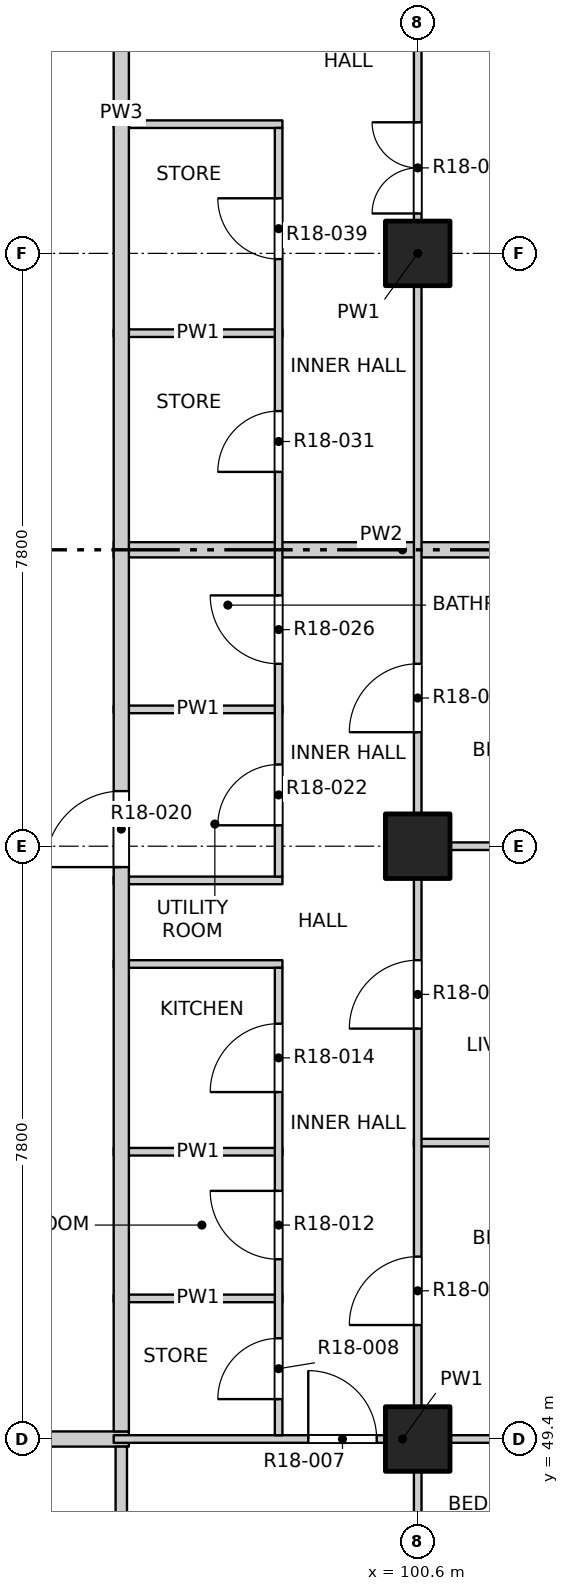
"""IFC4 building model, lengths in metres.
Left out: names, types, materials, properties, quantities, classifications, styles, units other than length and angle.
Written with IfcOpenShell. Run it as: python <this file> out.ifc"""

import sys

from ifc_helpers import new_model, si_unit, direction, frame, frame_2d, origin, origin_2d, place, context, subcontext, project, spatial, rectangle, extrude, element, fill, save


model = new_model("IFC4")
c1 = context("Model", 3, precision=1e-05, world=origin(), true_north=direction((0.0, 1.0)))
c2 = subcontext(c1, "Body", "Model", "MODEL_VIEW")
j1 = project(units=[si_unit("LENGTHUNIT", "METRE"), si_unit("PLANEANGLEUNIT", "RADIAN")], contexts=[c1])
p1 = place(None, origin())
s1 = spatial("IfcSite", under=j1, at=p1, CompositionType="ELEMENT")
p2 = place(p1, origin())
s2 = spatial("IfcBuilding", under=s1, at=p2, CompositionType="ELEMENT")
p3 = place(p2, frame((0.0, 0.0, 186.0)))
s3 = spatial("IfcBuildingStorey", under=s2, at=p3, CompositionType="ELEMENT", Elevation=186.0)
for number, where, z_axis, x_axis in (
    (1, (100.6, 49.4, -0.25), (0.0, 0.0, 1.0), (1.0, 0.0, 0.0)),
    (2, (100.6, 57.2, -0.25), (0.0, 0.0, 1.0), (1.0, 0.0, 0.0)),
    (3, (100.6, 65.0, -0.25), (0.0, 0.0, 1.0), (1.0, 0.0, 0.0)),
):
    element("IfcColumn", number, at=place(p3, frame(where, z_axis=z_axis, x_axis=x_axis)), inside=s3, PredefinedType="COLUMN", context=c2, shape_type="SweptSolid", body=[
        extrude(rectangle(XDim=0.85, YDim=0.85, at=origin_2d()), origin(), (0.0, 0.0, 1.0), 3.4),
    ])
p4 = place(p3, frame((73.2, 49.4, 0.0), z_axis=(0.0, 0.0, 1.0), x_axis=(1.0, 0.0, 0.0)))
e4 = element("IfcWall", 4, at=p4, inside=s3, PredefinedType="PARTITIONING", context=c2, shape_type="SweptSolid", body=[
    extrude(rectangle(XDim=23.6, YDim=0.2, at=frame_2d((11.8, 0.0))), origin(), (0.0, 0.0, 1.0), 3.15),
])
p5 = place(p4, frame((4.525, 0.0, 0.0)))
e5 = element("IfcOpeningElement", 5, at=p5, cuts=e4, PredefinedType="OPENING", context=c2, shape_type="SweptSolid", body=[
    extrude(rectangle(XDim=1.2, YDim=2.1, at=frame_2d((0.6, 1.05))), frame((0.0, 0.11, 0.0), z_axis=(0.0, -1.0, 0.0), x_axis=(1.0, 0.0, 0.0)), (0.0, 0.0, 1.0), 0.22),
])
p6 = place(p4, frame((12.325, 0.0, 0.0)))
e6 = element("IfcOpeningElement", 6, at=p6, cuts=e4, PredefinedType="OPENING", context=c2, shape_type="SweptSolid", body=[
    extrude(rectangle(XDim=1.2, YDim=2.1, at=frame_2d((0.6, 1.05))), frame((0.0, 0.11, 0.0), z_axis=(0.0, -1.0, 0.0), x_axis=(1.0, 0.0, 0.0)), (0.0, 0.0, 1.0), 0.22),
])
p7 = place(p4, frame((20.125, 0.0, 0.0)))
e7 = element("IfcOpeningElement", 7, at=p7, cuts=e4, PredefinedType="OPENING", context=c2, shape_type="SweptSolid", body=[
    extrude(rectangle(XDim=1.2, YDim=2.1, at=frame_2d((0.6, 1.05))), frame((0.0, 0.11, 0.0), z_axis=(0.0, -1.0, 0.0), x_axis=(1.0, 0.0, 0.0)), (0.0, 0.0, 1.0), 0.22),
])
p8 = place(p3, frame((96.6, 49.4, 0.0), z_axis=(0.0, 0.0, 1.0), x_axis=(1.0, 0.0, 0.0)))
e8 = element("IfcWall", 8, at=p8, inside=s3, PredefinedType="PARTITIONING", context=c2, shape_type="SweptSolid", body=[
    extrude(rectangle(XDim=7.6, YDim=0.1, at=frame_2d((3.8, 0.0))), origin(), (0.0, 0.0, 1.0), 3.15),
])
p9 = place(p8, frame((2.56, 0.0, 0.0)))
e9 = element("IfcOpeningElement", 9, at=p9, cuts=e8, PredefinedType="OPENING", context=c2, shape_type="SweptSolid", body=[
    extrude(rectangle(XDim=0.9, YDim=2.1, at=frame_2d((0.45, 1.05))), frame((0.0, 0.06, 0.0), z_axis=(0.0, -1.0, 0.0), x_axis=(1.0, 0.0, 0.0)), (0.0, 0.0, 1.0), 0.12),
])
for number, where, z_axis, x_axis in (
    (10, (96.6, 51.25, 0.0), (0.0, 0.0, 1.0), (1.0, 0.0, 0.0)),
    (11, (96.6, 53.18, 0.0), (0.0, 0.0, 1.0), (1.0, 0.0, 0.0)),
):
    element("IfcWall", number, at=place(p3, frame(where, z_axis=z_axis, x_axis=x_axis)), inside=s3, PredefinedType="PARTITIONING", context=c2, shape_type="SweptSolid", body=[
        extrude(rectangle(XDim=2.22, YDim=0.1, at=frame_2d((1.11, 0.0))), origin(), (0.0, 0.0, 1.0), 3.15),
    ])
p10 = place(p3, frame((100.55, 53.3, 0.0), z_axis=(0.0, 0.0, 1.0), x_axis=(1.0, 0.0, 0.0)))
e12 = element("IfcWall", 12, at=p10, inside=s3, PredefinedType="PARTITIONING", context=c2, shape_type="SweptSolid", body=[
    extrude(rectangle(XDim=3.65, YDim=0.1, at=frame_2d((1.825, 0.0))), origin(), (0.0, 0.0, 1.0), 3.15),
])
for number, where, z_axis, x_axis in (
    (13, (96.6, 55.65, 0.0), (0.0, 0.0, 1.0), (1.0, 0.0, 0.0)),
    (14, (96.6, 56.75, 0.0), (0.0, 0.0, 1.0), (1.0, 0.0, 0.0)),
):
    element("IfcWall", number, at=place(p3, frame(where, z_axis=z_axis, x_axis=x_axis)), inside=s3, PredefinedType="PARTITIONING", context=c2, shape_type="SweptSolid", body=[
        extrude(rectangle(XDim=2.22, YDim=0.1, at=frame_2d((1.11, 0.0))), origin(), (0.0, 0.0, 1.0), 3.15),
    ])
p11 = place(p3, frame((100.55, 57.2, 0.0), z_axis=(0.0, 0.0, 1.0), x_axis=(1.0, 0.0, 0.0)))
e15 = element("IfcWall", 15, at=p11, inside=s3, PredefinedType="PARTITIONING", context=c2, shape_type="SweptSolid", body=[
    extrude(rectangle(XDim=3.65, YDim=0.1, at=frame_2d((1.825, 0.0))), origin(), (0.0, 0.0, 1.0), 3.15),
])
p12 = place(p3, frame((96.6, 59.0, 0.0), z_axis=(0.0, 0.0, 1.0), x_axis=(1.0, 0.0, 0.0)))
e16 = element("IfcWall", 16, at=p12, inside=s3, PredefinedType="PARTITIONING", context=c2, shape_type="SweptSolid", body=[
    extrude(rectangle(XDim=2.22, YDim=0.1, at=frame_2d((1.11, 0.0))), origin(), (0.0, 0.0, 1.0), 3.15),
])
p13 = place(p3, frame((96.6, 61.1, 0.0), z_axis=(0.0, 0.0, 1.0), x_axis=(1.0, 0.0, 0.0)))
e17 = element("IfcWall", 17, at=p13, inside=s3, PredefinedType="PARTITIONING", context=c2, shape_type="SweptSolid", body=[
    extrude(rectangle(XDim=7.6, YDim=0.2, at=frame_2d((3.8, 0.0))), origin(), (0.0, 0.0, 1.0), 2.55),
])
for number, where, z_axis, x_axis in (
    (18, (96.6, 63.95, 0.0), (0.0, 0.0, 1.0), (1.0, 0.0, 0.0)),
    (19, (96.6, 66.7, 0.0), (0.0, 0.0, 1.0), (1.0, 0.0, 0.0)),
):
    element("IfcWall", number, at=place(p3, frame(where, z_axis=z_axis, x_axis=x_axis)), inside=s3, PredefinedType="PARTITIONING", context=c2, shape_type="SweptSolid", body=[
        extrude(rectangle(XDim=2.22, YDim=0.1, at=frame_2d((1.11, 0.0))), origin(), (0.0, 0.0, 1.0), 3.15),
    ])
p14 = place(p3, frame((96.7, 45.8, 0.0), z_axis=(0.0, 0.0, 1.0), x_axis=(0.0, 1.0, 0.0)))
e20 = element("IfcWall", 20, at=p14, inside=s3, PredefinedType="PARTITIONING", context=c2, shape_type="SweptSolid", body=[
    extrude(rectangle(XDim=3.5, YDim=0.15, at=frame_2d((1.75, 0.0))), origin(), (0.0, 0.0, 1.0), 3.15),
])
p15 = place(p3, frame((96.7, 49.5, 0.0), z_axis=(0.0, 0.0, 1.0), x_axis=(0.0, 1.0, 0.0)))
e21 = element("IfcWall", 21, at=p15, inside=s3, PredefinedType="PARTITIONING", context=c2, shape_type="SweptSolid", body=[
    extrude(rectangle(XDim=34.7, YDim=0.2, at=frame_2d((17.35, 0.0))), origin(), (0.0, 0.0, 1.0), 3.15),
])
p16 = place(p15, frame((7.425, 0.0, 0.0)))
e22 = element("IfcOpeningElement", 22, at=p16, cuts=e21, PredefinedType="OPENING", context=c2, shape_type="SweptSolid", body=[
    extrude(rectangle(XDim=1.0, YDim=2.1, at=frame_2d((0.5, 1.05))), frame((0.0, 0.11, 0.0), z_axis=(0.0, -1.0, 0.0), x_axis=(1.0, 0.0, 0.0)), (0.0, 0.0, 1.0), 0.22),
])
p17 = place(p15, frame((18.475, 0.0, 0.0)))
e23 = element("IfcOpeningElement", 23, at=p17, cuts=e21, PredefinedType="OPENING", context=c2, shape_type="SweptSolid", body=[
    extrude(rectangle(XDim=1.0, YDim=2.1, at=frame_2d((0.5, 1.05))), frame((0.0, 0.11, 0.0), z_axis=(0.0, -1.0, 0.0), x_axis=(1.0, 0.0, 0.0)), (0.0, 0.0, 1.0), 0.22),
])
p18 = place(p15, frame((29.025, 0.0, 0.0)))
e24 = element("IfcOpeningElement", 24, at=p18, cuts=e21, PredefinedType="OPENING", context=c2, shape_type="SweptSolid", body=[
    extrude(rectangle(XDim=1.0, YDim=2.1, at=frame_2d((0.5, 1.05))), frame((0.0, 0.11, 0.0), z_axis=(0.0, -1.0, 0.0), x_axis=(1.0, 0.0, 0.0)), (0.0, 0.0, 1.0), 0.22),
])
p19 = place(p3, frame((98.77, 49.45, 0.0), z_axis=(0.0, 0.0, 1.0), x_axis=(0.0, 1.0, 0.0)))
e25 = element("IfcWall", 25, at=p19, inside=s3, PredefinedType="PARTITIONING", context=c2, shape_type="SweptSolid", body=[
    extrude(rectangle(XDim=6.15, YDim=0.1, at=frame_2d((3.075, 0.0))), origin(), (0.0, 0.0, 1.0), 3.15),
])
p20 = place(p19, frame((0.475, 0.0, 0.0)))
e26 = element("IfcOpeningElement", 26, at=p20, cuts=e25, PredefinedType="OPENING", context=c2, shape_type="SweptSolid", body=[
    extrude(rectangle(XDim=0.8, YDim=2.1, at=frame_2d((0.4, 1.05))), frame((0.0, 0.06, 0.0), z_axis=(0.0, -1.0, 0.0), x_axis=(1.0, 0.0, 0.0)), (0.0, 0.0, 1.0), 0.12),
])
p21 = place(p19, frame((2.315, 0.0, 0.0)))
e27 = element("IfcOpeningElement", 27, at=p21, cuts=e25, PredefinedType="OPENING", context=c2, shape_type="SweptSolid", body=[
    extrude(rectangle(XDim=0.9, YDim=2.1, at=frame_2d((0.45, 1.05))), frame((0.0, 0.06, 0.0), z_axis=(0.0, -1.0, 0.0), x_axis=(1.0, 0.0, 0.0)), (0.0, 0.0, 1.0), 0.12),
])
p22 = place(p19, frame((4.515, 0.0, 0.0)))
e28 = element("IfcOpeningElement", 28, at=p22, cuts=e25, PredefinedType="OPENING", context=c2, shape_type="SweptSolid", body=[
    extrude(rectangle(XDim=0.9, YDim=2.1, at=frame_2d((0.45, 1.05))), frame((0.0, 0.06, 0.0), z_axis=(0.0, -1.0, 0.0), x_axis=(1.0, 0.0, 0.0)), (0.0, 0.0, 1.0), 0.12),
])
p23 = place(p3, frame((98.77, 56.8, 0.0), z_axis=(0.0, 0.0, 1.0), x_axis=(0.0, 1.0, 0.0)))
e29 = element("IfcWall", 29, at=p23, inside=s3, PredefinedType="PARTITIONING", context=c2, shape_type="SweptSolid", body=[
    extrude(rectangle(XDim=9.85, YDim=0.1, at=frame_2d((4.925, 0.0))), origin(), (0.0, 0.0, 1.0), 3.15),
])
p24 = place(p23, frame((0.675, 0.0, 0.0)))
e30 = element("IfcOpeningElement", 30, at=p24, cuts=e29, PredefinedType="OPENING", context=c2, shape_type="SweptSolid", body=[
    extrude(rectangle(XDim=0.8, YDim=2.1, at=frame_2d((0.4, 1.05))), frame((0.0, 0.06, 0.0), z_axis=(0.0, -1.0, 0.0), x_axis=(1.0, 0.0, 0.0)), (0.0, 0.0, 1.0), 0.12),
])
p25 = place(p23, frame((2.8, 0.0, 0.0)))
e31 = element("IfcOpeningElement", 31, at=p25, cuts=e29, PredefinedType="OPENING", context=c2, shape_type="SweptSolid", body=[
    extrude(rectangle(XDim=0.9, YDim=2.1, at=frame_2d((0.45, 1.05))), frame((0.0, 0.06, 0.0), z_axis=(0.0, -1.0, 0.0), x_axis=(1.0, 0.0, 0.0)), (0.0, 0.0, 1.0), 0.12),
])
p26 = place(p23, frame((5.325, 0.0, 0.0)))
e32 = element("IfcOpeningElement", 32, at=p26, cuts=e29, PredefinedType="OPENING", context=c2, shape_type="SweptSolid", body=[
    extrude(rectangle(XDim=0.8, YDim=2.1, at=frame_2d((0.4, 1.05))), frame((0.0, 0.06, 0.0), z_axis=(0.0, -1.0, 0.0), x_axis=(1.0, 0.0, 0.0)), (0.0, 0.0, 1.0), 0.12),
])
p27 = place(p23, frame((8.125, 0.0, 0.0)))
e33 = element("IfcOpeningElement", 33, at=p27, cuts=e29, PredefinedType="OPENING", context=c2, shape_type="SweptSolid", body=[
    extrude(rectangle(XDim=0.8, YDim=2.1, at=frame_2d((0.4, 1.05))), frame((0.0, 0.06, 0.0), z_axis=(0.0, -1.0, 0.0), x_axis=(1.0, 0.0, 0.0)), (0.0, 0.0, 1.0), 0.12),
])
p28 = place(p3, frame((100.6, 45.8, 0.0), z_axis=(0.0, 0.0, 1.0), x_axis=(0.0, 1.0, 0.0)))
e34 = element("IfcWall", 34, at=p28, inside=s3, PredefinedType="PARTITIONING", context=c2, shape_type="SweptSolid", body=[
    extrude(rectangle(XDim=38.4, YDim=0.1, at=frame_2d((19.2, 0.0))), origin(), (0.0, 0.0, 1.0), 3.15),
])
p29 = place(p28, frame((1.05, 0.0, 0.0)))
e35 = element("IfcOpeningElement", 35, at=p29, cuts=e34, PredefinedType="OPENING", context=c2, shape_type="SweptSolid", body=[
    extrude(rectangle(XDim=1.2, YDim=2.1, at=frame_2d((0.6, 1.05))), frame((0.0, 0.06, 0.0), z_axis=(0.0, -1.0, 0.0), x_axis=(1.0, 0.0, 0.0)), (0.0, 0.0, 1.0), 0.12),
])
p30 = place(p28, frame((5.1, 0.0, 0.0)))
e36 = element("IfcOpeningElement", 36, at=p30, cuts=e34, PredefinedType="OPENING", context=c2, shape_type="SweptSolid", body=[
    extrude(rectangle(XDim=0.9, YDim=2.1, at=frame_2d((0.45, 1.05))), frame((0.0, 0.06, 0.0), z_axis=(0.0, -1.0, 0.0), x_axis=(1.0, 0.0, 0.0)), (0.0, 0.0, 1.0), 0.12),
])
p31 = place(p28, frame((9.0, 0.0, 0.0)))
e37 = element("IfcOpeningElement", 37, at=p31, cuts=e34, PredefinedType="OPENING", context=c2, shape_type="SweptSolid", body=[
    extrude(rectangle(XDim=0.9, YDim=2.1, at=frame_2d((0.45, 1.05))), frame((0.0, 0.06, 0.0), z_axis=(0.0, -1.0, 0.0), x_axis=(1.0, 0.0, 0.0)), (0.0, 0.0, 1.0), 0.12),
])
p32 = place(p28, frame((12.9, 0.0, 0.0)))
e38 = element("IfcOpeningElement", 38, at=p32, cuts=e34, PredefinedType="OPENING", context=c2, shape_type="SweptSolid", body=[
    extrude(rectangle(XDim=0.9, YDim=2.1, at=frame_2d((0.45, 1.05))), frame((0.0, 0.06, 0.0), z_axis=(0.0, -1.0, 0.0), x_axis=(1.0, 0.0, 0.0)), (0.0, 0.0, 1.0), 0.12),
])
p33 = place(p28, frame((19.725, 0.0, 0.0)))
e39 = element("IfcOpeningElement", 39, at=p33, cuts=e34, PredefinedType="OPENING", context=c2, shape_type="SweptSolid", body=[
    extrude(rectangle(XDim=1.2, YDim=2.1, at=frame_2d((0.6, 1.05))), frame((0.0, 0.06, 0.0), z_axis=(0.0, -1.0, 0.0), x_axis=(1.0, 0.0, 0.0)), (0.0, 0.0, 1.0), 0.12),
])
p34 = place(p28, frame((24.6, 0.0, 0.0)))
e40 = element("IfcOpeningElement", 40, at=p34, cuts=e34, PredefinedType="OPENING", context=c2, shape_type="SweptSolid", body=[
    extrude(rectangle(XDim=0.9, YDim=2.1, at=frame_2d((0.45, 1.05))), frame((0.0, 0.06, 0.0), z_axis=(0.0, -1.0, 0.0), x_axis=(1.0, 0.0, 0.0)), (0.0, 0.0, 1.0), 0.12),
])
p35 = place(p28, frame((28.5, 0.0, 0.0)))
e41 = element("IfcOpeningElement", 41, at=p35, cuts=e34, PredefinedType="OPENING", context=c2, shape_type="SweptSolid", body=[
    extrude(rectangle(XDim=0.9, YDim=2.1, at=frame_2d((0.45, 1.05))), frame((0.0, 0.06, 0.0), z_axis=(0.0, -1.0, 0.0), x_axis=(1.0, 0.0, 0.0)), (0.0, 0.0, 1.0), 0.12),
])
p36 = place(p28, frame((32.4, 0.0, 0.0)))
e42 = element("IfcOpeningElement", 42, at=p36, cuts=e34, PredefinedType="OPENING", context=c2, shape_type="SweptSolid", body=[
    extrude(rectangle(XDim=0.9, YDim=2.1, at=frame_2d((0.45, 1.05))), frame((0.0, 0.06, 0.0), z_axis=(0.0, -1.0, 0.0), x_axis=(1.0, 0.0, 0.0)), (0.0, 0.0, 1.0), 0.12),
])
p37 = place(p28, frame((36.15, 0.0, 0.0)))
e43 = element("IfcOpeningElement", 43, at=p37, cuts=e34, PredefinedType="OPENING", context=c2, shape_type="SweptSolid", body=[
    extrude(rectangle(XDim=1.2, YDim=2.1, at=frame_2d((0.6, 1.05))), frame((0.0, 0.06, 0.0), z_axis=(0.0, -1.0, 0.0), x_axis=(1.0, 0.0, 0.0)), (0.0, 0.0, 1.0), 0.12),
])
p38 = place(p9, origin())
e44 = element("IfcDoor", 44, at=p38, inside=s3, OperationType="SINGLE_SWING_LEFT", PredefinedType="DOOR", context=c2, shape_type="SweptSolid", body=[
    extrude(rectangle(XDim=0.9, YDim=2.1, at=frame_2d((0.45, 1.05))), frame((0.0, 0.025, 0.0), z_axis=(0.0, -1.0, 0.0), x_axis=(1.0, 0.0, 0.0)), (0.0, 0.0, 1.0), 0.05),
])
fill(e9, e44)
p39 = place(p20, origin())
e45 = element("IfcDoor", 45, at=p39, inside=s3, OperationType="SINGLE_SWING_LEFT", PredefinedType="DOOR", context=c2, shape_type="SweptSolid", body=[
    extrude(rectangle(XDim=0.8, YDim=2.1, at=frame_2d((0.4, 1.05))), frame((0.0, 0.025, 0.0), z_axis=(0.0, -1.0, 0.0), x_axis=(1.0, 0.0, 0.0)), (0.0, 0.0, 1.0), 0.05),
])
fill(e26, e45)
p40 = place(p30, origin())
e46 = element("IfcDoor", 46, at=p40, inside=s3, OperationType="SINGLE_SWING_LEFT", PredefinedType="DOOR", context=c2, shape_type="SweptSolid", body=[
    extrude(rectangle(XDim=0.9, YDim=2.1, at=frame_2d((0.45, 1.05))), frame((0.0, 0.025, 0.0), z_axis=(0.0, -1.0, 0.0), x_axis=(1.0, 0.0, 0.0)), (0.0, 0.0, 1.0), 0.05),
])
fill(e36, e46)
p41 = place(p21, origin())
e47 = element("IfcDoor", 47, at=p41, inside=s3, OperationType="SINGLE_SWING_RIGHT", PredefinedType="DOOR", context=c2, shape_type="SweptSolid", body=[
    extrude(rectangle(XDim=0.9, YDim=2.1, at=frame_2d((0.45, 1.05))), frame((0.0, 0.025, 0.0), z_axis=(0.0, -1.0, 0.0), x_axis=(1.0, 0.0, 0.0)), (0.0, 0.0, 1.0), 0.05),
])
fill(e27, e47)
p42 = place(p22, origin())
e48 = element("IfcDoor", 48, at=p42, inside=s3, OperationType="SINGLE_SWING_LEFT", PredefinedType="DOOR", context=c2, shape_type="SweptSolid", body=[
    extrude(rectangle(XDim=0.9, YDim=2.1, at=frame_2d((0.45, 1.05))), frame((0.0, 0.025, 0.0), z_axis=(0.0, -1.0, 0.0), x_axis=(1.0, 0.0, 0.0)), (0.0, 0.0, 1.0), 0.05),
])
fill(e28, e48)
p43 = place(p31, origin())
e49 = element("IfcDoor", 49, at=p43, inside=s3, OperationType="SINGLE_SWING_LEFT", PredefinedType="DOOR", context=c2, shape_type="SweptSolid", body=[
    extrude(rectangle(XDim=0.9, YDim=2.1, at=frame_2d((0.45, 1.05))), frame((0.0, 0.025, 0.0), z_axis=(0.0, -1.0, 0.0), x_axis=(1.0, 0.0, 0.0)), (0.0, 0.0, 1.0), 0.05),
])
fill(e37, e49)
p44 = place(p16, origin())
e50 = element("IfcDoor", 50, at=p44, inside=s3, OperationType="SINGLE_SWING_LEFT", PredefinedType="DOOR", context=c2, shape_type="SweptSolid", body=[
    extrude(rectangle(XDim=1.0, YDim=2.1, at=frame_2d((0.5, 1.05))), frame((0.0, 0.025, 0.0), z_axis=(0.0, -1.0, 0.0), x_axis=(1.0, 0.0, 0.0)), (0.0, 0.0, 1.0), 0.05),
])
fill(e22, e50)
p45 = place(p24, origin())
e51 = element("IfcDoor", 51, at=p45, inside=s3, OperationType="SINGLE_SWING_LEFT", PredefinedType="DOOR", context=c2, shape_type="SweptSolid", body=[
    extrude(rectangle(XDim=0.8, YDim=2.1, at=frame_2d((0.4, 1.05))), frame((0.0, 0.025, 0.0), z_axis=(0.0, -1.0, 0.0), x_axis=(1.0, 0.0, 0.0)), (0.0, 0.0, 1.0), 0.05),
])
fill(e30, e51)
p46 = place(p32, origin())
e52 = element("IfcDoor", 52, at=p46, inside=s3, OperationType="SINGLE_SWING_LEFT", PredefinedType="DOOR", context=c2, shape_type="SweptSolid", body=[
    extrude(rectangle(XDim=0.9, YDim=2.1, at=frame_2d((0.45, 1.05))), frame((0.0, 0.025, 0.0), z_axis=(0.0, -1.0, 0.0), x_axis=(1.0, 0.0, 0.0)), (0.0, 0.0, 1.0), 0.05),
])
fill(e38, e52)
p47 = place(p25, origin())
e53 = element("IfcDoor", 53, at=p47, inside=s3, OperationType="SINGLE_SWING_RIGHT", PredefinedType="DOOR", context=c2, shape_type="SweptSolid", body=[
    extrude(rectangle(XDim=0.9, YDim=2.1, at=frame_2d((0.45, 1.05))), frame((0.0, 0.025, 0.0), z_axis=(0.0, -1.0, 0.0), x_axis=(1.0, 0.0, 0.0)), (0.0, 0.0, 1.0), 0.05),
])
fill(e31, e53)
p48 = place(p26, origin())
e54 = element("IfcDoor", 54, at=p48, inside=s3, OperationType="SINGLE_SWING_LEFT", PredefinedType="DOOR", context=c2, shape_type="SweptSolid", body=[
    extrude(rectangle(XDim=0.8, YDim=2.1, at=frame_2d((0.4, 1.05))), frame((0.0, 0.025, 0.0), z_axis=(0.0, -1.0, 0.0), x_axis=(1.0, 0.0, 0.0)), (0.0, 0.0, 1.0), 0.05),
])
fill(e32, e54)
p49 = place(p27, origin())
e55 = element("IfcDoor", 55, at=p49, inside=s3, OperationType="SINGLE_SWING_RIGHT", PredefinedType="DOOR", context=c2, shape_type="SweptSolid", body=[
    extrude(rectangle(XDim=0.8, YDim=2.1, at=frame_2d((0.4, 1.05))), frame((0.0, 0.025, 0.0), z_axis=(0.0, -1.0, 0.0), x_axis=(1.0, 0.0, 0.0)), (0.0, 0.0, 1.0), 0.05),
])
fill(e33, e55)
p50 = place(p33, origin())
e56 = element("IfcDoor", 56, at=p50, inside=s3, OperationType="DOUBLE_DOOR_SINGLE_SWING", PredefinedType="DOOR", context=c2, shape_type="SweptSolid", body=[
    extrude(rectangle(XDim=1.2, YDim=2.1, at=frame_2d((0.6, 1.05))), frame((0.0, 0.025, 0.0), z_axis=(0.0, -1.0, 0.0), x_axis=(1.0, 0.0, 0.0)), (0.0, 0.0, 1.0), 0.05),
])
fill(e39, e56)
save(model, sys.argv[1])
